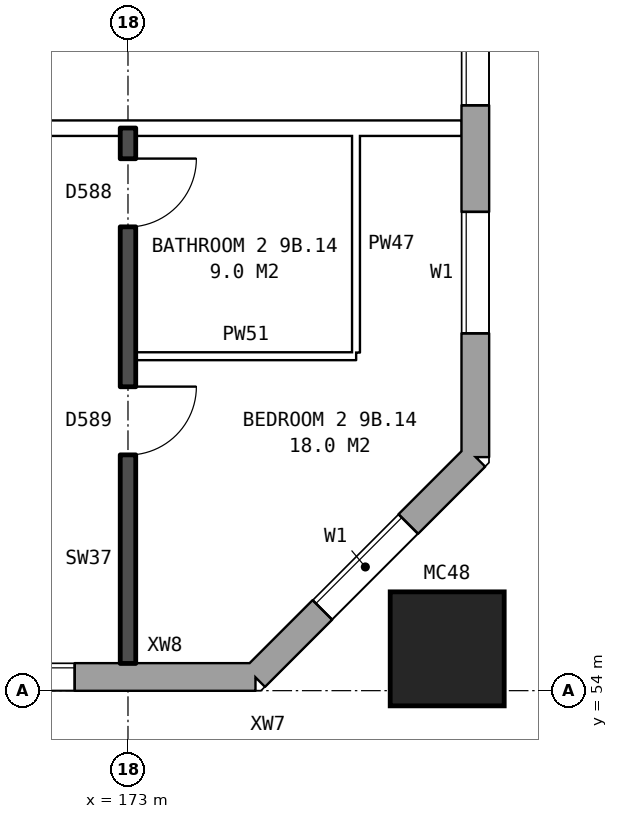
"""IFC4 building model, lengths in metres.
Left out: names, types, materials, properties, quantities, classifications, styles, units other than length and angle.
Written with IfcOpenShell. Run it as: python <this file> out.ifc"""

import sys

from ifc_helpers import new_model, si_unit, direction, frame, frame_2d, origin, origin_2d, place, context, subcontext, project, spatial, rectangle, hollow_rectangle, extrude, element, fill, save


model = new_model("IFC4")
c1 = context("Model", 3, precision=1e-05, world=origin(), true_north=direction((0.0, 1.0)))
c2 = subcontext(c1, "Body", "Model", "MODEL_VIEW")
j1 = project(units=[si_unit("LENGTHUNIT", "METRE"), si_unit("PLANEANGLEUNIT", "RADIAN")], contexts=[c1])
p1 = place(None, origin())
s1 = spatial("IfcSite", under=j1, at=p1, CompositionType="ELEMENT")
p2 = place(p1, origin())
s2 = spatial("IfcBuilding", under=s1, at=p2, CompositionType="ELEMENT")
p3 = place(p2, frame((0.0, 0.0, 35.0)))
s3 = spatial("IfcBuildingStorey", under=s2, at=p3, CompositionType="ELEMENT", Elevation=35.0)
p4 = place(p3, frame((177.2, 54.55, 0.0), z_axis=(0.0, 0.0, 1.0), x_axis=(1.0, 0.0, 0.0)))
e1 = element("IfcColumn", 1, at=p4, inside=s3, PredefinedType="COLUMN", context=c2, shape_type="SweptSolid", body=[
    extrude(hollow_rectangle(XDim=1.5, YDim=1.5, WallThickness=0.08, at=origin_2d()), origin(), (0.0, 0.0, 1.0), 3.1),
])
p5 = place(p3, frame((134.075, 54.18, 0.0), z_axis=(0.0, 0.0, 1.0), x_axis=(1.0, 0.0, 0.0)))
e2 = element("IfcWall", 2, at=p5, inside=s3, PredefinedType="STANDARD", context=c2, shape_type="SweptSolid", body=[
    extrude(rectangle(XDim=40.601, YDim=0.36, at=frame_2d((20.3, 0.0))), origin(), (0.0, 0.0, 1.0), 2.85),
])
p6 = place(p5, frame((0.625, 0.0, 0.8)))
e3 = element("IfcOpeningElement", 3, at=p6, cuts=e2, PredefinedType="OPENING", context=c2, shape_type="SweptSolid", body=[
    extrude(rectangle(XDim=1.6, YDim=1.8, at=frame_2d((0.8, 0.9))), frame((0.0, 0.19, 0.0), z_axis=(0.0, -1.0, 0.0), x_axis=(1.0, 0.0, 0.0)), (0.0, 0.0, 1.0), 0.38),
])
p7 = place(p5, frame((3.625, 0.0, 0.8)))
e4 = element("IfcOpeningElement", 4, at=p7, cuts=e2, PredefinedType="OPENING", context=c2, shape_type="SweptSolid", body=[
    extrude(rectangle(XDim=1.6, YDim=1.8, at=frame_2d((0.8, 0.9))), frame((0.0, 0.19, 0.0), z_axis=(0.0, -1.0, 0.0), x_axis=(1.0, 0.0, 0.0)), (0.0, 0.0, 1.0), 0.38),
])
p8 = place(p5, frame((6.625, 0.0, 0.8)))
e5 = element("IfcOpeningElement", 5, at=p8, cuts=e2, PredefinedType="OPENING", context=c2, shape_type="SweptSolid", body=[
    extrude(rectangle(XDim=1.6, YDim=1.8, at=frame_2d((0.8, 0.9))), frame((0.0, 0.19, 0.0), z_axis=(0.0, -1.0, 0.0), x_axis=(1.0, 0.0, 0.0)), (0.0, 0.0, 1.0), 0.38),
])
p9 = place(p5, frame((9.625, 0.0, 0.8)))
e6 = element("IfcOpeningElement", 6, at=p9, cuts=e2, PredefinedType="OPENING", context=c2, shape_type="SweptSolid", body=[
    extrude(rectangle(XDim=1.6, YDim=1.8, at=frame_2d((0.8, 0.9))), frame((0.0, 0.19, 0.0), z_axis=(0.0, -1.0, 0.0), x_axis=(1.0, 0.0, 0.0)), (0.0, 0.0, 1.0), 0.38),
])
p10 = place(p5, frame((12.625, 0.0, 0.8)))
e7 = element("IfcOpeningElement", 7, at=p10, cuts=e2, PredefinedType="OPENING", context=c2, shape_type="SweptSolid", body=[
    extrude(rectangle(XDim=1.6, YDim=1.8, at=frame_2d((0.8, 0.9))), frame((0.0, 0.19, 0.0), z_axis=(0.0, -1.0, 0.0), x_axis=(1.0, 0.0, 0.0)), (0.0, 0.0, 1.0), 0.38),
])
p11 = place(p5, frame((15.625, 0.0, 0.8)))
e8 = element("IfcOpeningElement", 8, at=p11, cuts=e2, PredefinedType="OPENING", context=c2, shape_type="SweptSolid", body=[
    extrude(rectangle(XDim=1.6, YDim=1.8, at=frame_2d((0.8, 0.9))), frame((0.0, 0.19, 0.0), z_axis=(0.0, -1.0, 0.0), x_axis=(1.0, 0.0, 0.0)), (0.0, 0.0, 1.0), 0.38),
])
p12 = place(p5, frame((18.875, 0.0, 0.15)))
e9 = element("IfcOpeningElement", 9, at=p12, cuts=e2, PredefinedType="OPENING", context=c2, shape_type="SweptSolid", body=[
    extrude(rectangle(XDim=0.8, YDim=0.9, at=frame_2d((0.4, 0.45))), frame((0.0, 0.19, 0.0), z_axis=(0.0, -1.0, 0.0), x_axis=(1.0, 0.0, 0.0)), (0.0, 0.0, 1.0), 0.38),
])
p13 = place(p5, frame((22.175, 0.0, 1.7)))
e10 = element("IfcOpeningElement", 10, at=p13, cuts=e2, PredefinedType="OPENING", context=c2, shape_type="SweptSolid", body=[
    extrude(rectangle(XDim=0.8, YDim=0.9, at=frame_2d((0.4, 0.45))), frame((0.0, 0.19, 0.0), z_axis=(0.0, -1.0, 0.0), x_axis=(1.0, 0.0, 0.0)), (0.0, 0.0, 1.0), 0.38),
])
p14 = place(p5, frame((24.625, 0.0, 0.8)))
e11 = element("IfcOpeningElement", 11, at=p14, cuts=e2, PredefinedType="OPENING", context=c2, shape_type="SweptSolid", body=[
    extrude(rectangle(XDim=1.6, YDim=1.8, at=frame_2d((0.8, 0.9))), frame((0.0, 0.19, 0.0), z_axis=(0.0, -1.0, 0.0), x_axis=(1.0, 0.0, 0.0)), (0.0, 0.0, 1.0), 0.38),
])
p15 = place(p5, frame((27.625, 0.0, 0.8)))
e12 = element("IfcOpeningElement", 12, at=p15, cuts=e2, PredefinedType="OPENING", context=c2, shape_type="SweptSolid", body=[
    extrude(rectangle(XDim=1.6, YDim=1.8, at=frame_2d((0.8, 0.9))), frame((0.0, 0.19, 0.0), z_axis=(0.0, -1.0, 0.0), x_axis=(1.0, 0.0, 0.0)), (0.0, 0.0, 1.0), 0.38),
])
p16 = place(p5, frame((30.625, 0.0, 0.8)))
e13 = element("IfcOpeningElement", 13, at=p16, cuts=e2, PredefinedType="OPENING", context=c2, shape_type="SweptSolid", body=[
    extrude(rectangle(XDim=1.6, YDim=1.8, at=frame_2d((0.8, 0.9))), frame((0.0, 0.19, 0.0), z_axis=(0.0, -1.0, 0.0), x_axis=(1.0, 0.0, 0.0)), (0.0, 0.0, 1.0), 0.38),
])
p17 = place(p5, frame((33.625, 0.0, 0.8)))
e14 = element("IfcOpeningElement", 14, at=p17, cuts=e2, PredefinedType="OPENING", context=c2, shape_type="SweptSolid", body=[
    extrude(rectangle(XDim=1.6, YDim=1.8, at=frame_2d((0.8, 0.9))), frame((0.0, 0.19, 0.0), z_axis=(0.0, -1.0, 0.0), x_axis=(1.0, 0.0, 0.0)), (0.0, 0.0, 1.0), 0.38),
])
p18 = place(p5, frame((36.625, 0.0, 0.8)))
e15 = element("IfcOpeningElement", 15, at=p18, cuts=e2, PredefinedType="OPENING", context=c2, shape_type="SweptSolid", body=[
    extrude(rectangle(XDim=1.6, YDim=1.8, at=frame_2d((0.8, 0.9))), frame((0.0, 0.19, 0.0), z_axis=(0.0, -1.0, 0.0), x_axis=(1.0, 0.0, 0.0)), (0.0, 0.0, 1.0), 0.38),
])
p19 = place(p5, frame((19.975, 0.0, 0.15)))
e16 = element("IfcOpeningElement", 16, at=p19, cuts=e2, PredefinedType="OPENING", context=c2, shape_type="SweptSolid", body=[
    extrude(rectangle(XDim=0.6, YDim=1.8, at=frame_2d((0.3, 0.9))), frame((0.0, 0.19, 0.0), z_axis=(0.0, -1.0, 0.0), x_axis=(1.0, 0.0, 0.0)), (0.0, 0.0, 1.0), 0.38),
])
p20 = place(p5, frame((23.325, 0.0, 0.8)))
e17 = element("IfcOpeningElement", 17, at=p20, cuts=e2, PredefinedType="OPENING", context=c2, shape_type="SweptSolid", body=[
    extrude(rectangle(XDim=1.0, YDim=1.8, at=frame_2d((0.5, 0.9))), frame((0.0, 0.19, 0.0), z_axis=(0.0, -1.0, 0.0), x_axis=(1.0, 0.0, 0.0)), (0.0, 0.0, 1.0), 0.38),
])
p21 = place(p3, frame((174.675, 54.18, 0.0), z_axis=(0.0, 0.0, 1.0), x_axis=(0.707106781187, 0.707106781187, 0.0)))
e18 = element("IfcWall", 18, at=p21, inside=s3, PredefinedType="STANDARD", context=c2, shape_type="SweptSolid", body=[
    extrude(rectangle(XDim=4.094, YDim=0.36, at=frame_2d((2.047, 0.0))), origin(), (0.0, 0.0, 1.0), 2.85),
])
p22 = place(p21, frame((1.247, 0.0, 0.8)))
e19 = element("IfcOpeningElement", 19, at=p22, cuts=e18, PredefinedType="OPENING", context=c2, shape_type="SweptSolid", body=[
    extrude(rectangle(XDim=1.6, YDim=1.8, at=frame_2d((0.8, 0.9))), frame((0.0, 0.19, 0.0), z_axis=(0.0, -1.0, 0.0), x_axis=(1.0, 0.0, 0.0)), (0.0, 0.0, 1.0), 0.38),
])
p23 = place(p3, frame((177.57, 57.075, 0.0), z_axis=(0.0, 0.0, 1.0), x_axis=(0.0, 1.0, 0.0)))
e20 = element("IfcWall", 20, at=p23, inside=s3, PredefinedType="STANDARD", context=c2, shape_type="SweptSolid", body=[
    extrude(rectangle(XDim=25.851, YDim=0.36, at=frame_2d((12.925, 0.0))), origin(), (0.0, 0.0, 1.0), 2.85),
])
p24 = place(p23, frame((1.625, 0.0, 0.8)))
e21 = element("IfcOpeningElement", 21, at=p24, cuts=e20, PredefinedType="OPENING", context=c2, shape_type="SweptSolid", body=[
    extrude(rectangle(XDim=1.6, YDim=1.8, at=frame_2d((0.8, 0.9))), frame((0.0, 0.19, 0.0), z_axis=(0.0, -1.0, 0.0), x_axis=(1.0, 0.0, 0.0)), (0.0, 0.0, 1.0), 0.38),
])
p25 = place(p23, frame((4.625, 0.0, 0.8)))
e22 = element("IfcOpeningElement", 22, at=p25, cuts=e20, PredefinedType="OPENING", context=c2, shape_type="SweptSolid", body=[
    extrude(rectangle(XDim=1.6, YDim=1.8, at=frame_2d((0.8, 0.9))), frame((0.0, 0.19, 0.0), z_axis=(0.0, -1.0, 0.0), x_axis=(1.0, 0.0, 0.0)), (0.0, 0.0, 1.0), 0.38),
])
p26 = place(p23, frame((7.625, 0.0, 0.8)))
e23 = element("IfcOpeningElement", 23, at=p26, cuts=e20, PredefinedType="OPENING", context=c2, shape_type="SweptSolid", body=[
    extrude(rectangle(XDim=1.6, YDim=1.8, at=frame_2d((0.8, 0.9))), frame((0.0, 0.19, 0.0), z_axis=(0.0, -1.0, 0.0), x_axis=(1.0, 0.0, 0.0)), (0.0, 0.0, 1.0), 0.38),
])
p27 = place(p23, frame((10.625, 0.0, 0.8)))
e24 = element("IfcOpeningElement", 24, at=p27, cuts=e20, PredefinedType="OPENING", context=c2, shape_type="SweptSolid", body=[
    extrude(rectangle(XDim=1.6, YDim=1.8, at=frame_2d((0.8, 0.9))), frame((0.0, 0.19, 0.0), z_axis=(0.0, -1.0, 0.0), x_axis=(1.0, 0.0, 0.0)), (0.0, 0.0, 1.0), 0.38),
])
p28 = place(p23, frame((13.625, 0.0, 0.8)))
e25 = element("IfcOpeningElement", 25, at=p28, cuts=e20, PredefinedType="OPENING", context=c2, shape_type="SweptSolid", body=[
    extrude(rectangle(XDim=1.6, YDim=1.8, at=frame_2d((0.8, 0.9))), frame((0.0, 0.19, 0.0), z_axis=(0.0, -1.0, 0.0), x_axis=(1.0, 0.0, 0.0)), (0.0, 0.0, 1.0), 0.38),
])
p29 = place(p23, frame((16.625, 0.0, 0.8)))
e26 = element("IfcOpeningElement", 26, at=p29, cuts=e20, PredefinedType="OPENING", context=c2, shape_type="SweptSolid", body=[
    extrude(rectangle(XDim=1.6, YDim=1.8, at=frame_2d((0.8, 0.9))), frame((0.0, 0.19, 0.0), z_axis=(0.0, -1.0, 0.0), x_axis=(1.0, 0.0, 0.0)), (0.0, 0.0, 1.0), 0.38),
])
p30 = place(p23, frame((19.625, 0.0, 0.8)))
e27 = element("IfcOpeningElement", 27, at=p30, cuts=e20, PredefinedType="OPENING", context=c2, shape_type="SweptSolid", body=[
    extrude(rectangle(XDim=1.6, YDim=1.8, at=frame_2d((0.8, 0.9))), frame((0.0, 0.19, 0.0), z_axis=(0.0, -1.0, 0.0), x_axis=(1.0, 0.0, 0.0)), (0.0, 0.0, 1.0), 0.38),
])
p31 = place(p23, frame((22.625, 0.0, 0.8)))
e28 = element("IfcOpeningElement", 28, at=p31, cuts=e20, PredefinedType="OPENING", context=c2, shape_type="SweptSolid", body=[
    extrude(rectangle(XDim=1.6, YDim=1.8, at=frame_2d((0.8, 0.9))), frame((0.0, 0.19, 0.0), z_axis=(0.0, -1.0, 0.0), x_axis=(1.0, 0.0, 0.0)), (0.0, 0.0, 1.0), 0.38),
])
p32 = place(p3, frame((173.1, 58.4, 0.0), z_axis=(0.0, 0.0, 1.0), x_axis=(1.0, 0.0, 0.0)))
e29 = element("IfcWall", 29, at=p32, inside=s3, PredefinedType="PARTITIONING", context=c2, shape_type="SweptSolid", body=[
    extrude(rectangle(XDim=2.9, YDim=0.1, at=frame_2d((1.45, 0.0))), origin(), (0.0, 0.0, 1.0), 2.85),
])
p33 = place(p3, frame((155.1, 61.4, 0.0), z_axis=(0.0, 0.0, 1.0), x_axis=(1.0, 0.0, 0.0)))
e30 = element("IfcWall", 30, at=p33, inside=s3, PredefinedType="PARTITIONING", context=c2, shape_type="SweptSolid", body=[
    extrude(rectangle(XDim=22.29, YDim=0.2, at=frame_2d((11.145, 0.0))), origin(), (0.0, 0.0, 1.0), 2.85),
])
p34 = place(p33, frame((2.45, 0.0, 0.0)))
e31 = element("IfcOpeningElement", 31, at=p34, cuts=e30, PredefinedType="OPENING", context=c2, shape_type="SweptSolid", body=[
    extrude(rectangle(XDim=1.0, YDim=2.1, at=frame_2d((0.5, 1.05))), frame((0.0, 0.11, 0.0), z_axis=(0.0, -1.0, 0.0), x_axis=(1.0, 0.0, 0.0)), (0.0, 0.0, 1.0), 0.22),
])
p35 = place(p33, frame((14.4, 0.0, 0.0)))
e32 = element("IfcOpeningElement", 32, at=p35, cuts=e30, PredefinedType="OPENING", context=c2, shape_type="SweptSolid", body=[
    extrude(rectangle(XDim=1.0, YDim=2.1, at=frame_2d((0.5, 1.05))), frame((0.0, 0.11, 0.0), z_axis=(0.0, -1.0, 0.0), x_axis=(1.0, 0.0, 0.0)), (0.0, 0.0, 1.0), 0.22),
])
p36 = place(p3, frame((173.0, 54.36, 0.0), z_axis=(0.0, 0.0, 1.0), x_axis=(0.0, 1.0, 0.0)))
e33 = element("IfcWall", 33, at=p36, inside=s3, PredefinedType="SOLIDWALL", context=c2, shape_type="SweptSolid", body=[
    extrude(rectangle(XDim=7.04, YDim=0.2, at=frame_2d((3.52, 0.0))), origin(), (0.0, 0.0, 1.0), 2.85),
])
p37 = place(p36, frame((2.74, 0.0, 0.0)))
e34 = element("IfcOpeningElement", 34, at=p37, cuts=e33, PredefinedType="OPENING", context=c2, shape_type="SweptSolid", body=[
    extrude(rectangle(XDim=0.9, YDim=2.1, at=frame_2d((0.45, 1.05))), frame((0.0, 0.11, 0.0), z_axis=(0.0, -1.0, 0.0), x_axis=(1.0, 0.0, 0.0)), (0.0, 0.0, 1.0), 0.22),
])
p38 = place(p36, frame((5.74, 0.0, 0.0)))
e35 = element("IfcOpeningElement", 35, at=p38, cuts=e33, PredefinedType="OPENING", context=c2, shape_type="SweptSolid", body=[
    extrude(rectangle(XDim=0.9, YDim=2.1, at=frame_2d((0.45, 1.05))), frame((0.0, 0.11, 0.0), z_axis=(0.0, -1.0, 0.0), x_axis=(1.0, 0.0, 0.0)), (0.0, 0.0, 1.0), 0.22),
])
p39 = place(p3, frame((176.0, 58.45, 0.0), z_axis=(0.0, 0.0, 1.0), x_axis=(0.0, 1.0, 0.0)))
e36 = element("IfcWall", 36, at=p39, inside=s3, PredefinedType="PARTITIONING", context=c2, shape_type="SweptSolid", body=[
    extrude(rectangle(XDim=2.85, YDim=0.1, at=frame_2d((1.425, 0.0))), origin(), (0.0, 0.0, 1.0), 2.85),
])
p40 = place(p18, origin())
e37 = element("IfcWindow", 37, at=p40, inside=s3, PartitioningType="SINGLE_PANEL", PredefinedType="WINDOW", context=c2, shape_type="SweptSolid", body=[
    extrude(rectangle(XDim=1.6, YDim=1.8, at=frame_2d((0.8, 0.9))), frame((0.0, 0.15, 0.0), z_axis=(0.0, -1.0, 0.0), x_axis=(1.0, 0.0, 0.0)), (0.0, 0.0, 1.0), 0.06),
])
fill(e15, e37)
p41 = place(p22, origin())
e38 = element("IfcWindow", 38, at=p41, inside=s3, PartitioningType="SINGLE_PANEL", PredefinedType="WINDOW", context=c2, shape_type="SweptSolid", body=[
    extrude(rectangle(XDim=1.6, YDim=1.8, at=frame_2d((0.8, 0.9))), frame((0.0, 0.15, 0.0), z_axis=(0.0, -1.0, 0.0), x_axis=(1.0, 0.0, 0.0)), (0.0, 0.0, 1.0), 0.06),
])
fill(e19, e38)
p42 = place(p24, origin())
e39 = element("IfcWindow", 39, at=p42, inside=s3, PartitioningType="SINGLE_PANEL", PredefinedType="WINDOW", context=c2, shape_type="SweptSolid", body=[
    extrude(rectangle(XDim=1.6, YDim=1.8, at=frame_2d((0.8, 0.9))), frame((0.0, 0.15, 0.0), z_axis=(0.0, -1.0, 0.0), x_axis=(1.0, 0.0, 0.0)), (0.0, 0.0, 1.0), 0.06),
])
fill(e21, e39)
p43 = place(p25, origin())
e40 = element("IfcWindow", 40, at=p43, inside=s3, PartitioningType="SINGLE_PANEL", PredefinedType="WINDOW", context=c2, shape_type="SweptSolid", body=[
    extrude(rectangle(XDim=1.6, YDim=1.8, at=frame_2d((0.8, 0.9))), frame((0.0, 0.15, 0.0), z_axis=(0.0, -1.0, 0.0), x_axis=(1.0, 0.0, 0.0)), (0.0, 0.0, 1.0), 0.06),
])
fill(e22, e40)
p44 = place(p37, frame((0.9, 0.0, 0.0), z_axis=(0.0, 0.0, 1.0), x_axis=(-1.0, 0.0, 0.0)))
e41 = element("IfcDoor", 41, at=p44, inside=s3, OperationType="SINGLE_SWING_LEFT", PredefinedType="DOOR", context=c2, shape_type="SweptSolid", body=[
    extrude(rectangle(XDim=0.9, YDim=2.1, at=frame_2d((0.45, 1.05))), frame((0.0, 0.025, 0.0), z_axis=(0.0, -1.0, 0.0), x_axis=(1.0, 0.0, 0.0)), (0.0, 0.0, 1.0), 0.05),
])
fill(e34, e41)
p45 = place(p38, frame((0.9, 0.0, 0.0), z_axis=(0.0, 0.0, 1.0), x_axis=(-1.0, 0.0, 0.0)))
e42 = element("IfcDoor", 42, at=p45, inside=s3, OperationType="SINGLE_SWING_LEFT", PredefinedType="DOOR", context=c2, shape_type="SweptSolid", body=[
    extrude(rectangle(XDim=0.9, YDim=2.1, at=frame_2d((0.45, 1.05))), frame((0.0, 0.025, 0.0), z_axis=(0.0, -1.0, 0.0), x_axis=(1.0, 0.0, 0.0)), (0.0, 0.0, 1.0), 0.05),
])
fill(e35, e42)
save(model, sys.argv[1])
